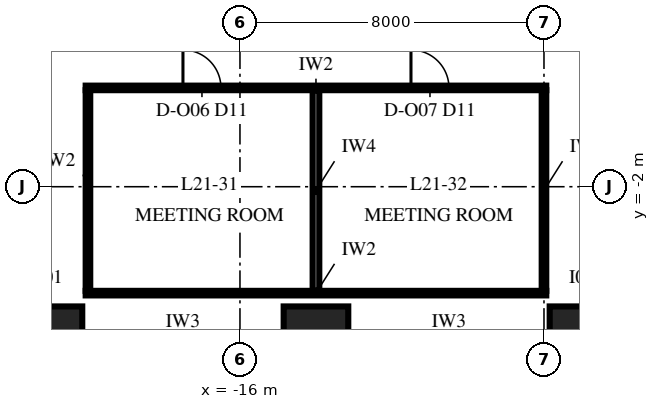
"""IFC4 building model, lengths in metres.
Left out: names, types, materials, properties, quantities, classifications, styles, units other than length and angle.
Written with IfcOpenShell. Run it as: python <this file> out.ifc"""

import sys

from ifc_helpers import new_model, si_unit, direction, frame, frame_2d, origin, origin_2d, place, context, subcontext, project, spatial, rectangle, extrude, element, fill, save


model = new_model("IFC4")
c1 = context("Model", 3, precision=1e-05, world=origin(), true_north=direction((0.0, 1.0)))
c2 = subcontext(c1, "Body", "Model", "MODEL_VIEW")
j1 = project(units=[si_unit("LENGTHUNIT", "METRE"), si_unit("PLANEANGLEUNIT", "RADIAN")], contexts=[c1])
p1 = place(None, origin())
s1 = spatial("IfcSite", under=j1, at=p1, CompositionType="ELEMENT")
p2 = place(p1, origin())
s2 = spatial("IfcBuilding", under=s1, at=p2, CompositionType="ELEMENT")
p3 = place(p2, frame((0.0, 0.0, 98.0)))
s3 = spatial("IfcBuildingStorey", under=s2, at=p3, CompositionType="ELEMENT", Elevation=98.0)
for number, where, z_axis, x_axis in (
    (1, (-21.0, -6.0, 0.0), (0.0, 0.0, 1.0), (1.0, 0.0, 0.0)),
    (2, (-14.0, -6.0, 0.0), (0.0, 0.0, 1.0), (1.0, 0.0, 0.0)),
    (3, (-7.0, -6.0, 0.0), (0.0, 0.0, 1.0), (1.0, 0.0, 0.0)),
):
    element("IfcColumn", number, at=place(p3, frame(where, z_axis=z_axis, x_axis=x_axis)), inside=s3, PredefinedType="COLUMN", context=c2, shape_type="SweptSolid", body=[
        extrude(rectangle(XDim=1.7, YDim=1.7, at=origin_2d()), origin(), (0.0, 0.0, 1.0), 5.0),
    ])
p4 = place(p3, frame((-20.06, -4.8, 0.0), z_axis=(0.0, 0.0, 1.0), x_axis=(1.0, 0.0, 0.0)))
e4 = element("IfcWall", 4, at=p4, inside=s3, PredefinedType="PARTITIONING", context=c2, shape_type="SweptSolid", body=[
    extrude(rectangle(XDim=12.12, YDim=0.12, at=frame_2d((6.06, 0.0))), origin(), (0.0, 0.0, 1.0), 4.25),
])
p5 = place(p3, frame((-20.06, 0.6, 0.0), z_axis=(0.0, 0.0, 1.0), x_axis=(1.0, 0.0, 0.0)))
e5 = element("IfcWall", 5, at=p5, inside=s3, PredefinedType="PARTITIONING", context=c2, shape_type="SweptSolid", body=[
    extrude(rectangle(XDim=12.12, YDim=0.12, at=frame_2d((6.06, 0.0))), origin(), (0.0, 0.0, 1.0), 4.25),
])
p6 = place(p5, frame((2.56, 0.0, 0.0)))
e6 = element("IfcOpeningElement", 6, at=p6, cuts=e5, PredefinedType="OPENING", context=c2, shape_type="SweptSolid", body=[
    extrude(rectangle(XDim=1.0, YDim=2.4, at=frame_2d((0.5, 1.2))), frame((0.0, 0.075, 0.0), z_axis=(0.0, -1.0, 0.0), x_axis=(1.0, 0.0, 0.0)), (0.0, 0.0, 1.0), 0.15),
])
p7 = place(p5, frame((8.56, 0.0, 0.0)))
e7 = element("IfcOpeningElement", 7, at=p7, cuts=e5, PredefinedType="OPENING", context=c2, shape_type="SweptSolid", body=[
    extrude(rectangle(XDim=1.0, YDim=2.4, at=frame_2d((0.5, 1.2))), frame((0.0, 0.075, 0.0), z_axis=(0.0, -1.0, 0.0), x_axis=(1.0, 0.0, 0.0)), (0.0, 0.0, 1.0), 0.15),
])
p8 = place(p3, frame((-20.0, -4.74, 0.0), z_axis=(0.0, 0.0, 1.0), x_axis=(0.0, 1.0, 0.0)))
e8 = element("IfcWall", 8, at=p8, inside=s3, PredefinedType="PARTITIONING", context=c2, shape_type="SweptSolid", body=[
    extrude(rectangle(XDim=5.28, YDim=0.12, at=frame_2d((2.64, 0.0))), origin(), (0.0, 0.0, 1.0), 4.85),
])
p9 = place(p3, frame((-14.0, -4.74, 0.0), z_axis=(0.0, 0.0, 1.0), x_axis=(0.0, 1.0, 0.0)))
e9 = element("IfcWall", 9, at=p9, inside=s3, PredefinedType="PARTITIONING", context=c2, shape_type="SweptSolid", body=[
    extrude(rectangle(XDim=5.28, YDim=0.175, at=frame_2d((2.64, 0.0))), origin(), (0.0, 0.0, 1.0), 4.25),
])
p10 = place(p3, frame((-8.0, -4.74, 0.0), z_axis=(0.0, 0.0, 1.0), x_axis=(0.0, 1.0, 0.0)))
e10 = element("IfcWall", 10, at=p10, inside=s3, PredefinedType="PARTITIONING", context=c2, shape_type="SweptSolid", body=[
    extrude(rectangle(XDim=5.28, YDim=0.12, at=frame_2d((2.64, 0.0))), origin(), (0.0, 0.0, 1.0), 4.85),
])
p11 = place(p6, origin())
e11 = element("IfcDoor", 11, at=p11, inside=s3, OperationType="SINGLE_SWING_RIGHT", PredefinedType="DOOR", context=c2, shape_type="SweptSolid", body=[
    extrude(rectangle(XDim=1.0, YDim=2.4, at=frame_2d((0.5, 1.2))), frame((0.0, 0.06, 0.0), z_axis=(0.0, -1.0, 0.0), x_axis=(1.0, 0.0, 0.0)), (0.0, 0.0, 1.0), 0.12),
])
fill(e6, e11)
p12 = place(p7, origin())
e12 = element("IfcDoor", 12, at=p12, inside=s3, OperationType="SINGLE_SWING_RIGHT", PredefinedType="DOOR", context=c2, shape_type="SweptSolid", body=[
    extrude(rectangle(XDim=1.0, YDim=2.4, at=frame_2d((0.5, 1.2))), frame((0.0, 0.06, 0.0), z_axis=(0.0, -1.0, 0.0), x_axis=(1.0, 0.0, 0.0)), (0.0, 0.0, 1.0), 0.12),
])
fill(e7, e12)
save(model, sys.argv[1])
